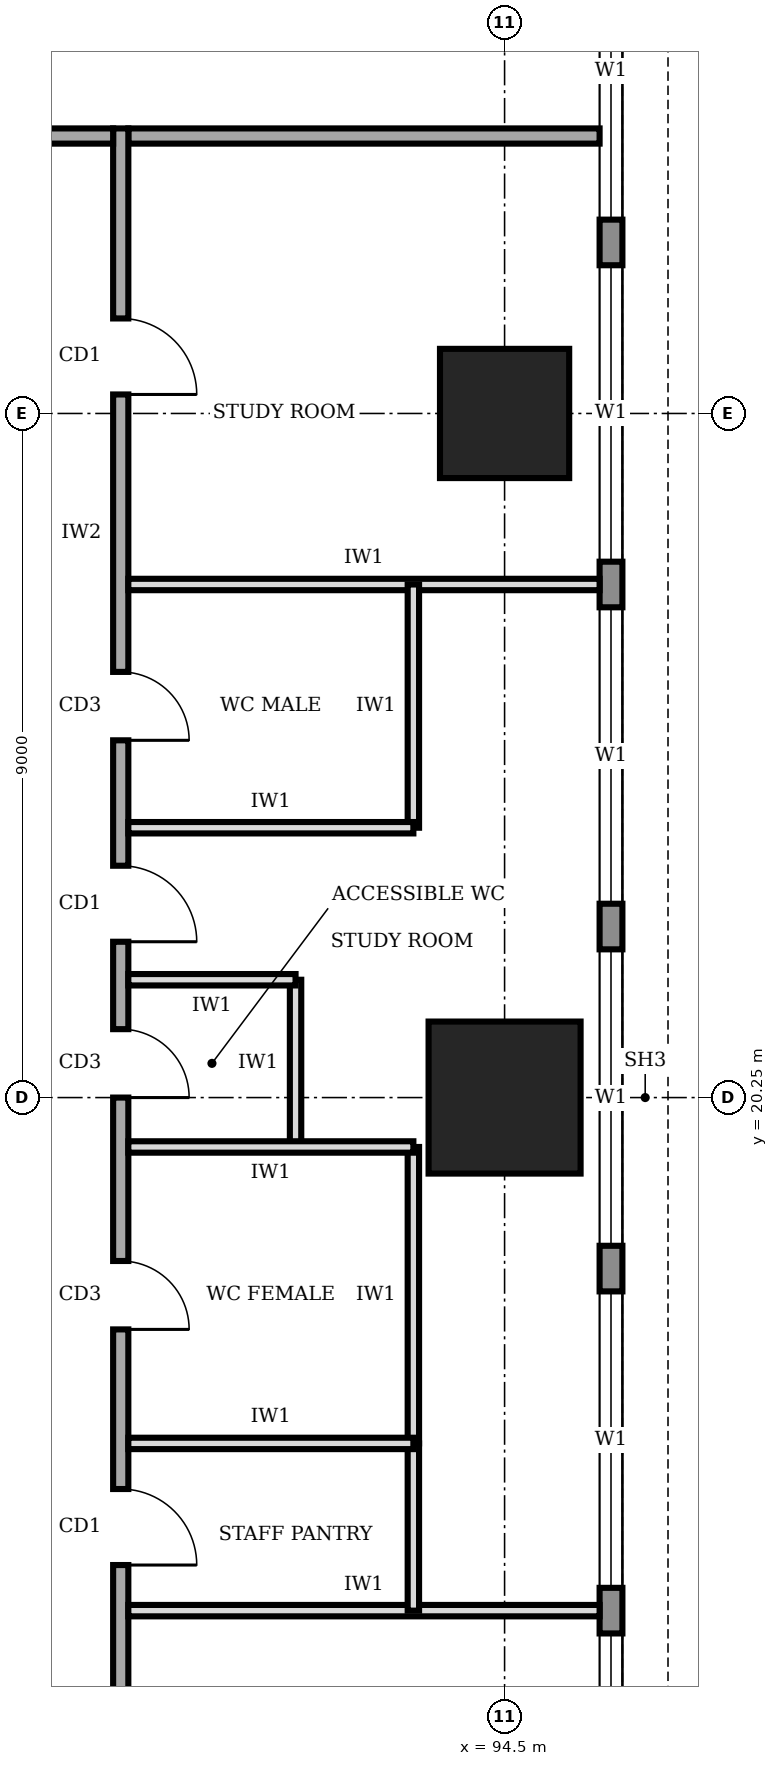
"""IFC4 building model, lengths in metres.
Left out: names, types, materials, properties, quantities, classifications, styles, units other than length and angle.
Written with IfcOpenShell. Run it as: python <this file> out.ifc"""

import sys

from ifc_helpers import new_model, si_unit, direction, frame, frame_2d, origin, origin_2d, place, context, subcontext, project, spatial, rectangle, extrude, element, fill, save


model = new_model("IFC4")
c1 = context("Model", 3, precision=1e-05, world=origin(), true_north=direction((0.0, 1.0)))
c2 = subcontext(c1, "Body", "Model", "MODEL_VIEW")
j1 = project(units=[si_unit("LENGTHUNIT", "METRE"), si_unit("PLANEANGLEUNIT", "RADIAN")], contexts=[c1])
p1 = place(None, origin())
s1 = spatial("IfcSite", under=j1, at=p1, CompositionType="ELEMENT")
p2 = place(p1, origin())
s2 = spatial("IfcBuilding", under=s1, at=p2, CompositionType="ELEMENT")
p3 = place(p2, frame((0.0, 0.0, 217.0)))
s3 = spatial("IfcBuildingStorey", under=s2, at=p3, CompositionType="ELEMENT", Elevation=217.0)
p4 = place(p3, frame((94.5, 20.25, 0.0), z_axis=(0.0, 0.0, 1.0), x_axis=(1.0, 0.0, 0.0)))
e1 = element("IfcColumn", 1, at=p4, inside=s3, PredefinedType="COLUMN", context=c2, shape_type="SweptSolid", body=[
    extrude(rectangle(XDim=2.0, YDim=2.0, at=origin_2d()), origin(), (0.0, 0.0, 1.0), 4.0),
])
p5 = place(p3, frame((94.5, 29.25, 0.0), z_axis=(0.0, 0.0, 1.0), x_axis=(1.0, 0.0, 0.0)))
e2 = element("IfcColumn", 2, at=p5, inside=s3, PredefinedType="COLUMN", context=c2, shape_type="SweptSolid", body=[
    extrude(rectangle(XDim=1.7, YDim=1.7, at=origin_2d()), origin(), (0.0, 0.0, 1.0), 4.0),
])
p6 = place(p3, frame((95.9, 3.32, 0.0), z_axis=(0.0, 0.0, 1.0), x_axis=(0.0, 1.0, 0.0)))
e3 = element("IfcWall", 3, at=p6, inside=s3, PredefinedType="STANDARD", context=c2, shape_type="SweptSolid", body=[
    extrude(rectangle(XDim=33.86, YDim=0.3, at=frame_2d((16.93, 0.0))), origin(), (0.0, 0.0, 1.0), 3.75),
])
p7 = place(p6, frame((1.48, 0.0, 0.9)))
e4 = element("IfcOpeningElement", 4, at=p7, cuts=e3, PredefinedType="OPENING", context=c2, shape_type="SweptSolid", body=[
    extrude(rectangle(XDim=3.9, YDim=2.2, at=frame_2d((1.95, 1.1))), frame((0.0, 0.16, 0.0), z_axis=(0.0, -1.0, 0.0), x_axis=(1.0, 0.0, 0.0)), (0.0, 0.0, 1.0), 0.32),
])
p8 = place(p6, frame((5.98, 0.0, 0.9)))
e5 = element("IfcOpeningElement", 5, at=p8, cuts=e3, PredefinedType="OPENING", context=c2, shape_type="SweptSolid", body=[
    extrude(rectangle(XDim=3.9, YDim=2.2, at=frame_2d((1.95, 1.1))), frame((0.0, 0.16, 0.0), z_axis=(0.0, -1.0, 0.0), x_axis=(1.0, 0.0, 0.0)), (0.0, 0.0, 1.0), 0.32),
])
p9 = place(p6, frame((10.48, 0.0, 0.9)))
e6 = element("IfcOpeningElement", 6, at=p9, cuts=e3, PredefinedType="OPENING", context=c2, shape_type="SweptSolid", body=[
    extrude(rectangle(XDim=3.9, YDim=2.2, at=frame_2d((1.95, 1.1))), frame((0.0, 0.16, 0.0), z_axis=(0.0, -1.0, 0.0), x_axis=(1.0, 0.0, 0.0)), (0.0, 0.0, 1.0), 0.32),
])
p10 = place(p6, frame((14.98, 0.0, 0.9)))
e7 = element("IfcOpeningElement", 7, at=p10, cuts=e3, PredefinedType="OPENING", context=c2, shape_type="SweptSolid", body=[
    extrude(rectangle(XDim=3.9, YDim=2.2, at=frame_2d((1.95, 1.1))), frame((0.0, 0.16, 0.0), z_axis=(0.0, -1.0, 0.0), x_axis=(1.0, 0.0, 0.0)), (0.0, 0.0, 1.0), 0.32),
])
p11 = place(p6, frame((19.48, 0.0, 0.9)))
e8 = element("IfcOpeningElement", 8, at=p11, cuts=e3, PredefinedType="OPENING", context=c2, shape_type="SweptSolid", body=[
    extrude(rectangle(XDim=3.9, YDim=2.2, at=frame_2d((1.95, 1.1))), frame((0.0, 0.16, 0.0), z_axis=(0.0, -1.0, 0.0), x_axis=(1.0, 0.0, 0.0)), (0.0, 0.0, 1.0), 0.32),
])
p12 = place(p6, frame((23.98, 0.0, 0.9)))
e9 = element("IfcOpeningElement", 9, at=p12, cuts=e3, PredefinedType="OPENING", context=c2, shape_type="SweptSolid", body=[
    extrude(rectangle(XDim=3.9, YDim=2.2, at=frame_2d((1.95, 1.1))), frame((0.0, 0.16, 0.0), z_axis=(0.0, -1.0, 0.0), x_axis=(1.0, 0.0, 0.0)), (0.0, 0.0, 1.0), 0.32),
])
p13 = place(p6, frame((28.48, 0.0, 0.9)))
e10 = element("IfcOpeningElement", 10, at=p13, cuts=e3, PredefinedType="OPENING", context=c2, shape_type="SweptSolid", body=[
    extrude(rectangle(XDim=3.9, YDim=2.2, at=frame_2d((1.95, 1.1))), frame((0.0, 0.16, 0.0), z_axis=(0.0, -1.0, 0.0), x_axis=(1.0, 0.0, 0.0)), (0.0, 0.0, 1.0), 0.32),
])
p14 = place(p3, frame((89.45, 9.2, 0.0), z_axis=(0.0, 0.0, 1.0), x_axis=(0.0, 1.0, 0.0)))
e11 = element("IfcWall", 11, at=p14, inside=s3, PredefinedType="SOLIDWALL", context=c2, shape_type="SweptSolid", body=[
    extrude(rectangle(XDim=23.8, YDim=0.2, at=frame_2d((11.9, 0.0))), origin(), (0.0, 0.0, 1.0), 3.75),
])
p15 = place(p14, frame((1.55, 0.0, 0.0)))
e12 = element("IfcOpeningElement", 12, at=p15, cuts=e11, PredefinedType="OPENING", context=c2, shape_type="SweptSolid", body=[
    extrude(rectangle(XDim=1.0, YDim=2.1, at=frame_2d((0.5, 1.05))), frame((0.0, 0.11, 0.0), z_axis=(0.0, -1.0, 0.0), x_axis=(1.0, 0.0, 0.0)), (0.0, 0.0, 1.0), 0.22),
])
p16 = place(p14, frame((4.9, 0.0, 0.0)))
e13 = element("IfcOpeningElement", 13, at=p16, cuts=e11, PredefinedType="OPENING", context=c2, shape_type="SweptSolid", body=[
    extrude(rectangle(XDim=1.0, YDim=2.1, at=frame_2d((0.5, 1.05))), frame((0.0, 0.11, 0.0), z_axis=(0.0, -1.0, 0.0), x_axis=(1.0, 0.0, 0.0)), (0.0, 0.0, 1.0), 0.22),
])
p17 = place(p14, frame((8.0, 0.0, 0.0)))
e14 = element("IfcOpeningElement", 14, at=p17, cuts=e11, PredefinedType="OPENING", context=c2, shape_type="SweptSolid", body=[
    extrude(rectangle(XDim=0.9, YDim=2.1, at=frame_2d((0.45, 1.05))), frame((0.0, 0.11, 0.0), z_axis=(0.0, -1.0, 0.0), x_axis=(1.0, 0.0, 0.0)), (0.0, 0.0, 1.0), 0.22),
])
p18 = place(p14, frame((11.05, 0.0, 0.0)))
e15 = element("IfcOpeningElement", 15, at=p18, cuts=e11, PredefinedType="OPENING", context=c2, shape_type="SweptSolid", body=[
    extrude(rectangle(XDim=0.9, YDim=2.1, at=frame_2d((0.45, 1.05))), frame((0.0, 0.11, 0.0), z_axis=(0.0, -1.0, 0.0), x_axis=(1.0, 0.0, 0.0)), (0.0, 0.0, 1.0), 0.22),
])
p19 = place(p14, frame((15.75, 0.0, 0.0)))
e16 = element("IfcOpeningElement", 16, at=p19, cuts=e11, PredefinedType="OPENING", context=c2, shape_type="SweptSolid", body=[
    extrude(rectangle(XDim=0.9, YDim=2.1, at=frame_2d((0.45, 1.05))), frame((0.0, 0.11, 0.0), z_axis=(0.0, -1.0, 0.0), x_axis=(1.0, 0.0, 0.0)), (0.0, 0.0, 1.0), 0.22),
])
p20 = place(p14, frame((13.1, 0.0, 0.0)))
e17 = element("IfcOpeningElement", 17, at=p20, cuts=e11, PredefinedType="OPENING", context=c2, shape_type="SweptSolid", body=[
    extrude(rectangle(XDim=1.0, YDim=2.1, at=frame_2d((0.5, 1.05))), frame((0.0, 0.11, 0.0), z_axis=(0.0, -1.0, 0.0), x_axis=(1.0, 0.0, 0.0)), (0.0, 0.0, 1.0), 0.22),
])
p21 = place(p14, frame((20.3, 0.0, 0.0)))
e18 = element("IfcOpeningElement", 18, at=p21, cuts=e11, PredefinedType="OPENING", context=c2, shape_type="SweptSolid", body=[
    extrude(rectangle(XDim=1.0, YDim=2.1, at=frame_2d((0.5, 1.05))), frame((0.0, 0.11, 0.0), z_axis=(0.0, -1.0, 0.0), x_axis=(1.0, 0.0, 0.0)), (0.0, 0.0, 1.0), 0.22),
])
p22 = place(p3, frame((89.35, 32.9, 0.0), z_axis=(0.0, 0.0, 1.0), x_axis=(-1.0, 0.0, 0.0)))
e19 = element("IfcWall", 19, at=p22, inside=s3, PredefinedType="SOLIDWALL", context=c2, shape_type="SweptSolid", body=[
    extrude(rectangle(XDim=16.9, YDim=0.2, at=frame_2d((8.45, 0.0))), origin(), (0.0, 0.0, 1.0), 3.75),
])
p23 = place(p22, frame((14.375, 0.0, 0.0)))
e20 = element("IfcOpeningElement", 20, at=p23, cuts=e19, PredefinedType="OPENING", context=c2, shape_type="SweptSolid", body=[
    extrude(rectangle(XDim=1.0, YDim=2.1, at=frame_2d((0.5, 1.05))), frame((0.0, 0.11, 0.0), z_axis=(0.0, -1.0, 0.0), x_axis=(1.0, 0.0, 0.0)), (0.0, 0.0, 1.0), 0.22),
])
p24 = place(p22, frame((1.325, 0.0, 0.0)))
e21 = element("IfcOpeningElement", 21, at=p24, cuts=e19, PredefinedType="OPENING", context=c2, shape_type="SweptSolid", body=[
    extrude(rectangle(XDim=1.0, YDim=2.1, at=frame_2d((0.5, 1.05))), frame((0.0, 0.11, 0.0), z_axis=(0.0, -1.0, 0.0), x_axis=(1.0, 0.0, 0.0)), (0.0, 0.0, 1.0), 0.22),
])
p25 = place(p3, frame((89.55, 32.9, 0.0), z_axis=(0.0, 0.0, 1.0), x_axis=(1.0, 0.0, 0.0)))
e22 = element("IfcWall", 22, at=p25, inside=s3, PredefinedType="SOLIDWALL", context=c2, shape_type="SweptSolid", body=[
    extrude(rectangle(XDim=6.2, YDim=0.2, at=frame_2d((3.1, 0.0))), origin(), (0.0, 0.0, 1.0), 3.75),
])
for number, where, z_axis, x_axis in (
    (23, (89.55, 13.5, 0.0), (0.0, 0.0, 1.0), (1.0, 0.0, 0.0)),
    (24, (89.55, 27.0, 0.0), (0.0, 0.0, 1.0), (1.0, 0.0, 0.0)),
):
    element("IfcWall", number, at=place(p3, frame(where, z_axis=z_axis, x_axis=x_axis)), inside=s3, PredefinedType="PARTITIONING", context=c2, shape_type="SweptSolid", body=[
        extrude(rectangle(XDim=6.2, YDim=0.15, at=frame_2d((3.1, 0.0))), origin(), (0.0, 0.0, 1.0), 3.75),
    ])
p26 = place(p3, frame((89.55, 15.7, 0.0), z_axis=(0.0, 0.0, 1.0), x_axis=(1.0, 0.0, 0.0)))
e25 = element("IfcWall", 25, at=p26, inside=s3, PredefinedType="PARTITIONING", context=c2, shape_type="SweptSolid", body=[
    extrude(rectangle(XDim=3.75, YDim=0.15, at=frame_2d((1.875, 0.0))), origin(), (0.0, 0.0, 1.0), 3.75),
])
p27 = place(p3, frame((89.55, 19.6, 0.0), z_axis=(0.0, 0.0, 1.0), x_axis=(1.0, 0.0, 0.0)))
e26 = element("IfcWall", 26, at=p27, inside=s3, PredefinedType="PARTITIONING", context=c2, shape_type="SweptSolid", body=[
    extrude(rectangle(XDim=3.75, YDim=0.15, at=frame_2d((1.875, 0.0))), origin(), (0.0, 0.0, 1.0), 2.85),
])
p28 = place(p3, frame((89.55, 21.8, 0.0), z_axis=(0.0, 0.0, 1.0), x_axis=(1.0, 0.0, 0.0)))
e27 = element("IfcWall", 27, at=p28, inside=s3, PredefinedType="PARTITIONING", context=c2, shape_type="SweptSolid", body=[
    extrude(rectangle(XDim=2.2, YDim=0.15, at=frame_2d((1.1, 0.0))), origin(), (0.0, 0.0, 1.0), 3.75),
])
p29 = place(p3, frame((89.55, 23.8, 0.0), z_axis=(0.0, 0.0, 1.0), x_axis=(1.0, 0.0, 0.0)))
e28 = element("IfcWall", 28, at=p29, inside=s3, PredefinedType="PARTITIONING", context=c2, shape_type="SweptSolid", body=[
    extrude(rectangle(XDim=3.75, YDim=0.15, at=frame_2d((1.875, 0.0))), origin(), (0.0, 0.0, 1.0), 3.75),
])
p30 = place(p3, frame((93.3, 13.5, 0.0), z_axis=(0.0, 0.0, 1.0), x_axis=(0.0, 1.0, 0.0)))
e29 = element("IfcWall", 29, at=p30, inside=s3, PredefinedType="PARTITIONING", context=c2, shape_type="SweptSolid", body=[
    extrude(rectangle(XDim=2.2, YDim=0.15, at=frame_2d((1.1, 0.0))), origin(), (0.0, 0.0, 1.0), 3.75),
])
p31 = place(p3, frame((93.3, 15.7, 0.0), z_axis=(0.0, 0.0, 1.0), x_axis=(0.0, 1.0, 0.0)))
e30 = element("IfcWall", 30, at=p31, inside=s3, PredefinedType="PARTITIONING", context=c2, shape_type="SweptSolid", body=[
    extrude(rectangle(XDim=3.9, YDim=0.15, at=frame_2d((1.95, 0.0))), origin(), (0.0, 0.0, 1.0), 3.75),
])
p32 = place(p3, frame((91.75, 19.6, 0.0), z_axis=(0.0, 0.0, 1.0), x_axis=(0.0, 1.0, 0.0)))
e31 = element("IfcWall", 31, at=p32, inside=s3, PredefinedType="PARTITIONING", context=c2, shape_type="SweptSolid", body=[
    extrude(rectangle(XDim=2.2, YDim=0.15, at=frame_2d((1.1, 0.0))), origin(), (0.0, 0.0, 1.0), 3.75),
])
p33 = place(p3, frame((93.3, 23.8, 0.0), z_axis=(0.0, 0.0, 1.0), x_axis=(0.0, 1.0, 0.0)))
e32 = element("IfcWall", 32, at=p33, inside=s3, PredefinedType="PARTITIONING", context=c2, shape_type="SweptSolid", body=[
    extrude(rectangle(XDim=3.2, YDim=0.15, at=frame_2d((1.6, 0.0))), origin(), (0.0, 0.0, 1.0), 3.75),
])
p34 = place(p8, origin())
e33 = element("IfcWindow", 33, at=p34, inside=s3, PartitioningType="SINGLE_PANEL", PredefinedType="WINDOW", context=c2, shape_type="SweptSolid", body=[
    extrude(rectangle(XDim=3.9, YDim=2.2, at=frame_2d((1.95, 1.1))), frame((0.0, 0.03, 0.0), z_axis=(0.0, -1.0, 0.0), x_axis=(1.0, 0.0, 0.0)), (0.0, 0.0, 1.0), 0.06),
])
fill(e5, e33)
p35 = place(p9, origin())
e34 = element("IfcWindow", 34, at=p35, inside=s3, PartitioningType="SINGLE_PANEL", PredefinedType="WINDOW", context=c2, shape_type="SweptSolid", body=[
    extrude(rectangle(XDim=3.9, YDim=2.2, at=frame_2d((1.95, 1.1))), frame((0.0, 0.03, 0.0), z_axis=(0.0, -1.0, 0.0), x_axis=(1.0, 0.0, 0.0)), (0.0, 0.0, 1.0), 0.06),
])
fill(e6, e34)
p36 = place(p10, origin())
e35 = element("IfcWindow", 35, at=p36, inside=s3, PartitioningType="SINGLE_PANEL", PredefinedType="WINDOW", context=c2, shape_type="SweptSolid", body=[
    extrude(rectangle(XDim=3.9, YDim=2.2, at=frame_2d((1.95, 1.1))), frame((0.0, 0.03, 0.0), z_axis=(0.0, -1.0, 0.0), x_axis=(1.0, 0.0, 0.0)), (0.0, 0.0, 1.0), 0.06),
])
fill(e7, e35)
p37 = place(p11, origin())
e36 = element("IfcWindow", 36, at=p37, inside=s3, PartitioningType="SINGLE_PANEL", PredefinedType="WINDOW", context=c2, shape_type="SweptSolid", body=[
    extrude(rectangle(XDim=3.9, YDim=2.2, at=frame_2d((1.95, 1.1))), frame((0.0, 0.03, 0.0), z_axis=(0.0, -1.0, 0.0), x_axis=(1.0, 0.0, 0.0)), (0.0, 0.0, 1.0), 0.06),
])
fill(e8, e36)
p38 = place(p12, origin())
e37 = element("IfcWindow", 37, at=p38, inside=s3, PartitioningType="SINGLE_PANEL", PredefinedType="WINDOW", context=c2, shape_type="SweptSolid", body=[
    extrude(rectangle(XDim=3.9, YDim=2.2, at=frame_2d((1.95, 1.1))), frame((0.0, 0.03, 0.0), z_axis=(0.0, -1.0, 0.0), x_axis=(1.0, 0.0, 0.0)), (0.0, 0.0, 1.0), 0.06),
])
fill(e9, e37)
p39 = place(p13, origin())
e38 = element("IfcWindow", 38, at=p39, inside=s3, PartitioningType="SINGLE_PANEL", PredefinedType="WINDOW", context=c2, shape_type="SweptSolid", body=[
    extrude(rectangle(XDim=3.9, YDim=2.2, at=frame_2d((1.95, 1.1))), frame((0.0, 0.03, 0.0), z_axis=(0.0, -1.0, 0.0), x_axis=(1.0, 0.0, 0.0)), (0.0, 0.0, 1.0), 0.06),
])
fill(e10, e38)
p40 = place(p16, frame((1.0, 0.0, 0.0), z_axis=(0.0, 0.0, 1.0), x_axis=(-1.0, 0.0, 0.0)))
e39 = element("IfcDoor", 39, at=p40, inside=s3, OperationType="SINGLE_SWING_RIGHT", PredefinedType="DOOR", context=c2, shape_type="SweptSolid", body=[
    extrude(rectangle(XDim=1.0, YDim=2.1, at=frame_2d((0.5, 1.05))), frame((0.0, 0.025, 0.0), z_axis=(0.0, -1.0, 0.0), x_axis=(1.0, 0.0, 0.0)), (0.0, 0.0, 1.0), 0.05),
])
fill(e13, e39)
p41 = place(p17, frame((0.9, 0.0, 0.0), z_axis=(0.0, 0.0, 1.0), x_axis=(-1.0, 0.0, 0.0)))
e40 = element("IfcDoor", 40, at=p41, inside=s3, OperationType="SINGLE_SWING_RIGHT", PredefinedType="DOOR", context=c2, shape_type="SweptSolid", body=[
    extrude(rectangle(XDim=0.9, YDim=2.1, at=frame_2d((0.45, 1.05))), frame((0.0, 0.025, 0.0), z_axis=(0.0, -1.0, 0.0), x_axis=(1.0, 0.0, 0.0)), (0.0, 0.0, 1.0), 0.05),
])
fill(e14, e40)
p42 = place(p18, frame((0.9, 0.0, 0.0), z_axis=(0.0, 0.0, 1.0), x_axis=(-1.0, 0.0, 0.0)))
e41 = element("IfcDoor", 41, at=p42, inside=s3, OperationType="SINGLE_SWING_RIGHT", PredefinedType="DOOR", context=c2, shape_type="SweptSolid", body=[
    extrude(rectangle(XDim=0.9, YDim=2.1, at=frame_2d((0.45, 1.05))), frame((0.0, 0.025, 0.0), z_axis=(0.0, -1.0, 0.0), x_axis=(1.0, 0.0, 0.0)), (0.0, 0.0, 1.0), 0.05),
])
fill(e15, e41)
p43 = place(p19, frame((0.9, 0.0, 0.0), z_axis=(0.0, 0.0, 1.0), x_axis=(-1.0, 0.0, 0.0)))
e42 = element("IfcDoor", 42, at=p43, inside=s3, OperationType="SINGLE_SWING_RIGHT", PredefinedType="DOOR", context=c2, shape_type="SweptSolid", body=[
    extrude(rectangle(XDim=0.9, YDim=2.1, at=frame_2d((0.45, 1.05))), frame((0.0, 0.025, 0.0), z_axis=(0.0, -1.0, 0.0), x_axis=(1.0, 0.0, 0.0)), (0.0, 0.0, 1.0), 0.05),
])
fill(e16, e42)
p44 = place(p20, frame((1.0, 0.0, 0.0), z_axis=(0.0, 0.0, 1.0), x_axis=(-1.0, 0.0, 0.0)))
e43 = element("IfcDoor", 43, at=p44, inside=s3, OperationType="SINGLE_SWING_RIGHT", PredefinedType="DOOR", context=c2, shape_type="SweptSolid", body=[
    extrude(rectangle(XDim=1.0, YDim=2.1, at=frame_2d((0.5, 1.05))), frame((0.0, 0.025, 0.0), z_axis=(0.0, -1.0, 0.0), x_axis=(1.0, 0.0, 0.0)), (0.0, 0.0, 1.0), 0.05),
])
fill(e17, e43)
p45 = place(p21, frame((1.0, 0.0, 0.0), z_axis=(0.0, 0.0, 1.0), x_axis=(-1.0, 0.0, 0.0)))
e44 = element("IfcDoor", 44, at=p45, inside=s3, OperationType="SINGLE_SWING_RIGHT", PredefinedType="DOOR", context=c2, shape_type="SweptSolid", body=[
    extrude(rectangle(XDim=1.0, YDim=2.1, at=frame_2d((0.5, 1.05))), frame((0.0, 0.025, 0.0), z_axis=(0.0, -1.0, 0.0), x_axis=(1.0, 0.0, 0.0)), (0.0, 0.0, 1.0), 0.05),
])
fill(e18, e44)
save(model, sys.argv[1])
